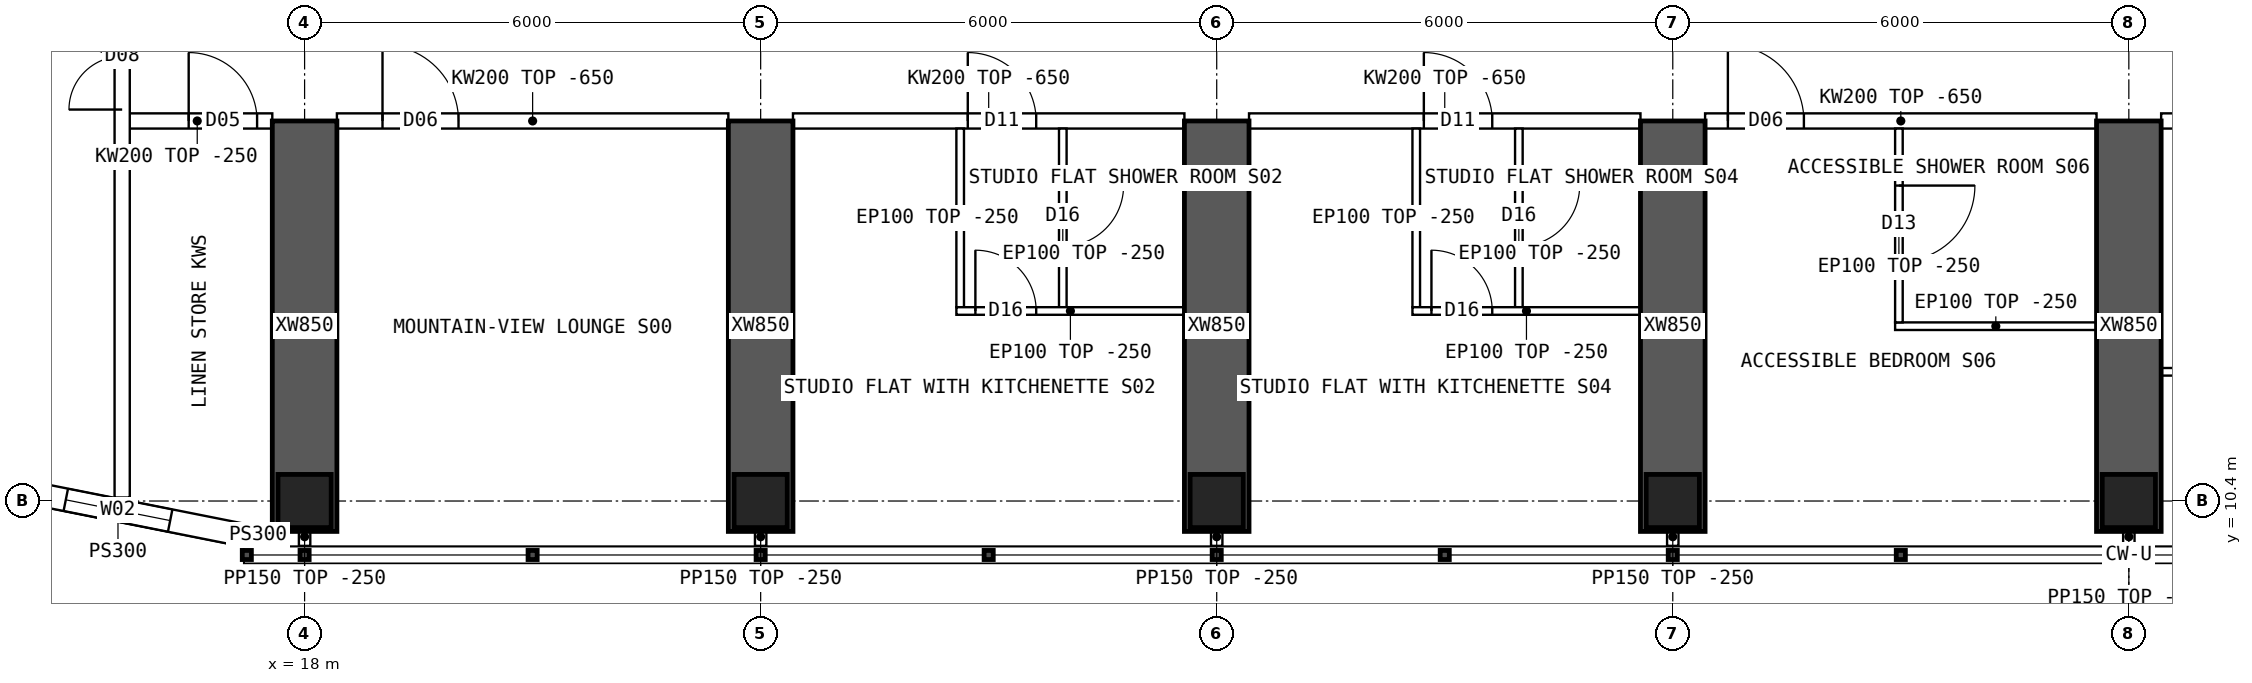
"""IFC4 building model, lengths in metres.
Left out: names, types, materials, properties, quantities, classifications, styles, units other than length and angle.
Written with IfcOpenShell. Run it as: python <this file> out.ifc"""

import sys

from ifc_helpers import new_model, si_unit, direction, frame, frame_2d, origin, origin_2d, place, context, subcontext, project, spatial, polyline, rectangle, hollow_rectangle, outline, extrude, element, fill, save


model = new_model("IFC4")
c1 = context("Model", 3, precision=1e-05, world=origin(), true_north=direction((0.0, 1.0)))
c2 = subcontext(c1, "Body", "Model", "MODEL_VIEW")
j1 = project(units=[si_unit("LENGTHUNIT", "METRE"), si_unit("PLANEANGLEUNIT", "RADIAN")], contexts=[c1])
p1 = place(None, origin())
s1 = spatial("IfcSite", under=j1, at=p1, CompositionType="ELEMENT")
p2 = place(p1, origin())
s2 = spatial("IfcBuilding", under=s1, at=p2, CompositionType="ELEMENT")
p3 = place(p2, frame((0.0, 0.0, 186.1)))
s3 = spatial("IfcBuildingStorey", under=s2, at=p3, CompositionType="ELEMENT", Elevation=186.1)
for number, where, z_axis, x_axis in (
    (1, (18.0, 10.4, 0.0), (0.0, 0.0, 1.0), (1.0, 0.0, 0.0)),
    (2, (24.0, 10.4, 0.0), (0.0, 0.0, 1.0), (1.0, 0.0, 0.0)),
    (3, (30.0, 10.4, 0.0), (0.0, 0.0, 1.0), (1.0, 0.0, 0.0)),
    (4, (36.0, 10.4, 0.0), (0.0, 0.0, 1.0), (1.0, 0.0, 0.0)),
    (5, (42.0, 10.4, 0.0), (0.0, 0.0, 1.0), (1.0, 0.0, 0.0)),
):
    element("IfcColumn", number, at=place(p3, frame(where, z_axis=z_axis, x_axis=x_axis)), inside=s3, PredefinedType="COLUMN", context=c2, shape_type="SweptSolid", body=[
        extrude(hollow_rectangle(XDim=0.7, YDim=0.7, WallThickness=0.07, at=origin_2d()), origin(), (0.0, 0.0, 1.0), 3.75),
    ])
for number, where, z_axis, x_axis in (
    (6, (18.0, 10.0, 0.0), (0.0, 0.0, 1.0), (0.0, 1.0, 0.0)),
    (7, (24.0, 10.0, 0.0), (0.0, 0.0, 1.0), (0.0, 1.0, 0.0)),
    (8, (30.0, 10.0, 0.0), (0.0, 0.0, 1.0), (0.0, 1.0, 0.0)),
    (9, (36.0, 10.0, 0.0), (0.0, 0.0, 1.0), (0.0, 1.0, 0.0)),
    (10, (42.0, 10.0, 0.0), (0.0, 0.0, 1.0), (0.0, 1.0, 0.0)),
):
    element("IfcWall", number, at=place(p3, frame(where, z_axis=z_axis, x_axis=x_axis)), inside=s3, PredefinedType="SHEAR", context=c2, shape_type="SweptSolid", body=[
        extrude(rectangle(XDim=5.4, YDim=0.85, at=frame_2d((2.7, 0.0))), origin(), (0.0, 0.0, 1.0), 3.75),
    ])
p4 = place(p3, frame((13.89, 10.608, 0.0), z_axis=(0.0, 0.0, 1.0), x_axis=(0.98078325777, -0.195100490205, 0.0)))
e11 = element("IfcWall", 11, at=p4, inside=s3, PredefinedType="SOLIDWALL", context=c2, shape_type="SweptSolid", body=[
    extrude(outline(polyline([(-0.03, -0.15), (3.405, -0.15), (3.345, 0.15), (0.03, 0.15), (-0.03, -0.15)])), origin(), (0.0, 0.0, 1.0), 3.5),
])
p5 = place(p4, frame((0.988, 0.0, 0.9)))
e12 = element("IfcOpeningElement", 12, at=p5, cuts=e11, PredefinedType="OPENING", context=c2, shape_type="SweptSolid", body=[
    extrude(rectangle(XDim=1.4, YDim=1.8, at=frame_2d((0.7, 0.9))), frame((0.0, 0.16, 0.0), z_axis=(0.0, -1.0, 0.0), x_axis=(1.0, 0.0, 0.0)), (0.0, 0.0, 1.0), 0.32),
])
p6 = place(p3, frame((17.2, 9.95, 0.0), z_axis=(0.0, 0.0, 1.0), x_axis=(1.0, 0.0, 0.0)))
e13 = element("IfcWall", 13, at=p6, inside=s3, PredefinedType="SOLIDWALL", context=c2, shape_type="SweptSolid", body=[
    extrude(rectangle(XDim=0.375, YDim=0.3, at=frame_2d((0.188, 0.0))), origin(), (0.0, 0.0, 1.0), 3.5),
])
p7 = place(p3, frame((15.6, 15.4, 0.0), z_axis=(0.0, 0.0, 1.0), x_axis=(1.0, 0.0, 0.0)))
e14 = element("IfcWall", 14, at=p7, inside=s3, PredefinedType="SOLIDWALL", context=c2, shape_type="SweptSolid", body=[
    extrude(rectangle(XDim=1.975, YDim=0.2, at=frame_2d((0.987, 0.0))), origin(), (0.0, 0.0, 1.0), 3.5),
])
p8 = place(p7, frame((0.875, 0.0, 0.0)))
e15 = element("IfcOpeningElement", 15, at=p8, cuts=e14, PredefinedType="OPENING", context=c2, shape_type="SweptSolid", body=[
    extrude(rectangle(XDim=0.9, YDim=2.1, at=frame_2d((0.45, 1.05))), frame((0.0, 0.11, 0.0), z_axis=(0.0, -1.0, 0.0), x_axis=(1.0, 0.0, 0.0)), (0.0, 0.0, 1.0), 0.22),
])
p9 = place(p3, frame((18.425, 15.4, 0.0), z_axis=(0.0, 0.0, 1.0), x_axis=(1.0, 0.0, 0.0)))
e16 = element("IfcWall", 16, at=p9, inside=s3, PredefinedType="SOLIDWALL", context=c2, shape_type="SweptSolid", body=[
    extrude(outline(polyline([(0.0, 0.0), (5.15, 0.0), (5.15, 3.1), (0.0, 3.1), (0.0, 0.0)])), frame((0.0, 0.1, 0.0), z_axis=(0.0, -1.0, 0.0), x_axis=(1.0, 0.0, 0.0)), (0.0, 0.0, 1.0), 0.2),
])
p10 = place(p9, frame((0.6, 0.0, 0.0)))
e17 = element("IfcOpeningElement", 17, at=p10, cuts=e16, PredefinedType="OPENING", context=c2, shape_type="SweptSolid", body=[
    extrude(rectangle(XDim=1.0, YDim=2.1, at=frame_2d((0.5, 1.05))), frame((0.0, 0.11, 0.0), z_axis=(0.0, -1.0, 0.0), x_axis=(1.0, 0.0, 0.0)), (0.0, 0.0, 1.0), 0.22),
])
p11 = place(p3, frame((24.425, 15.4, 0.0), z_axis=(0.0, 0.0, 1.0), x_axis=(1.0, 0.0, 0.0)))
e18 = element("IfcWall", 18, at=p11, inside=s3, PredefinedType="SOLIDWALL", context=c2, shape_type="SweptSolid", body=[
    extrude(outline(polyline([(0.0, 0.0), (5.15, 0.0), (5.15, 3.1), (0.0, 3.1), (0.0, 0.0)])), frame((0.0, 0.1, 0.0), z_axis=(0.0, -1.0, 0.0), x_axis=(1.0, 0.0, 0.0)), (0.0, 0.0, 1.0), 0.2),
])
p12 = place(p11, frame((2.3, 0.0, 0.0)))
e19 = element("IfcOpeningElement", 19, at=p12, cuts=e18, PredefinedType="OPENING", context=c2, shape_type="SweptSolid", body=[
    extrude(rectangle(XDim=0.9, YDim=2.1, at=frame_2d((0.45, 1.05))), frame((0.0, 0.11, 0.0), z_axis=(0.0, -1.0, 0.0), x_axis=(1.0, 0.0, 0.0)), (0.0, 0.0, 1.0), 0.22),
])
p13 = place(p3, frame((30.425, 15.4, 0.0), z_axis=(0.0, 0.0, 1.0), x_axis=(1.0, 0.0, 0.0)))
e20 = element("IfcWall", 20, at=p13, inside=s3, PredefinedType="SOLIDWALL", context=c2, shape_type="SweptSolid", body=[
    extrude(outline(polyline([(0.0, 0.0), (5.15, 0.0), (5.15, 3.1), (0.0, 3.1), (0.0, 0.0)])), frame((0.0, 0.1, 0.0), z_axis=(0.0, -1.0, 0.0), x_axis=(1.0, 0.0, 0.0)), (0.0, 0.0, 1.0), 0.2),
])
p14 = place(p13, frame((2.3, 0.0, 0.0)))
e21 = element("IfcOpeningElement", 21, at=p14, cuts=e20, PredefinedType="OPENING", context=c2, shape_type="SweptSolid", body=[
    extrude(rectangle(XDim=0.9, YDim=2.1, at=frame_2d((0.45, 1.05))), frame((0.0, 0.11, 0.0), z_axis=(0.0, -1.0, 0.0), x_axis=(1.0, 0.0, 0.0)), (0.0, 0.0, 1.0), 0.22),
])
p15 = place(p3, frame((36.425, 15.4, 0.0), z_axis=(0.0, 0.0, 1.0), x_axis=(1.0, 0.0, 0.0)))
e22 = element("IfcWall", 22, at=p15, inside=s3, PredefinedType="SOLIDWALL", context=c2, shape_type="SweptSolid", body=[
    extrude(outline(polyline([(0.0, 0.0), (5.15, 0.0), (5.15, 3.1), (0.0, 3.1), (0.0, 0.0)])), frame((0.0, 0.1, 0.0), z_axis=(0.0, -1.0, 0.0), x_axis=(1.0, 0.0, 0.0)), (0.0, 0.0, 1.0), 0.2),
])
p16 = place(p15, frame((0.3, 0.0, 0.0)))
e23 = element("IfcOpeningElement", 23, at=p16, cuts=e22, PredefinedType="OPENING", context=c2, shape_type="SweptSolid", body=[
    extrude(rectangle(XDim=1.0, YDim=2.1, at=frame_2d((0.5, 1.05))), frame((0.0, 0.11, 0.0), z_axis=(0.0, -1.0, 0.0), x_axis=(1.0, 0.0, 0.0)), (0.0, 0.0, 1.0), 0.22),
])
p17 = place(p3, frame((42.425, 15.4, 0.0), z_axis=(0.0, 0.0, 1.0), x_axis=(1.0, 0.0, 0.0)))
e24 = element("IfcWall", 24, at=p17, inside=s3, PredefinedType="SOLIDWALL", context=c2, shape_type="SweptSolid", body=[
    extrude(outline(polyline([(0.0, 0.0), (5.15, 0.0), (5.15, 3.1), (0.0, 3.1), (0.0, 0.0)])), frame((0.0, 0.1, 0.0), z_axis=(0.0, -1.0, 0.0), x_axis=(1.0, 0.0, 0.0)), (0.0, 0.0, 1.0), 0.2),
])
p18 = place(p17, frame((2.6, 0.0, 0.0)))
e25 = element("IfcOpeningElement", 25, at=p18, cuts=e24, PredefinedType="OPENING", context=c2, shape_type="SweptSolid", body=[
    extrude(rectangle(XDim=0.9, YDim=2.1, at=frame_2d((0.45, 1.05))), frame((0.0, 0.11, 0.0), z_axis=(0.0, -1.0, 0.0), x_axis=(1.0, 0.0, 0.0)), (0.0, 0.0, 1.0), 0.22),
])
p19 = place(p3, frame((29.575, 12.9, 0.0), z_axis=(0.0, 0.0, 1.0), x_axis=(-1.0, 0.0, 0.0)))
e26 = element("IfcWall", 26, at=p19, inside=s3, PredefinedType="PARTITIONING", context=c2, shape_type="SweptSolid", body=[
    extrude(rectangle(XDim=3.0, YDim=0.1, at=frame_2d((1.5, 0.0))), origin(), (0.0, 0.0, 1.0), 3.5),
])
p20 = place(p19, frame((1.95, 0.0, 0.0)))
e27 = element("IfcOpeningElement", 27, at=p20, cuts=e26, PredefinedType="OPENING", context=c2, shape_type="SweptSolid", body=[
    extrude(rectangle(XDim=0.8, YDim=2.1, at=frame_2d((0.4, 1.05))), frame((0.0, 0.06, 0.0), z_axis=(0.0, -1.0, 0.0), x_axis=(1.0, 0.0, 0.0)), (0.0, 0.0, 1.0), 0.12),
])
p21 = place(p3, frame((26.625, 12.95, 0.0), z_axis=(0.0, 0.0, 1.0), x_axis=(0.0, 1.0, 0.0)))
e28 = element("IfcWall", 28, at=p21, inside=s3, PredefinedType="PARTITIONING", context=c2, shape_type="SweptSolid", body=[
    extrude(outline(polyline([(0.0, 0.0), (2.35, 0.0), (2.35, 3.1), (2.302, 3.1), (2.3, 3.5), (0.0, 3.5), (0.0, 0.0)])), frame((0.0, 0.05, 0.0), z_axis=(0.0, -1.0, 0.0), x_axis=(1.0, 0.0, 0.0)), (0.0, 0.0, 1.0), 0.1),
])
p22 = place(p3, frame((27.975, 12.95, 0.0), z_axis=(0.0, 0.0, 1.0), x_axis=(0.0, 1.0, 0.0)))
e29 = element("IfcWall", 29, at=p22, inside=s3, PredefinedType="PARTITIONING", context=c2, shape_type="SweptSolid", body=[
    extrude(outline(polyline([(0.0, 0.0), (2.35, 0.0), (2.35, 3.1), (2.302, 3.1), (2.3, 3.5), (0.0, 3.5), (0.0, 0.0)])), frame((0.0, 0.05, 0.0), z_axis=(0.0, -1.0, 0.0), x_axis=(1.0, 0.0, 0.0)), (0.0, 0.0, 1.0), 0.1),
])
p23 = place(p22, frame((0.8, 0.0, 0.0)))
e30 = element("IfcOpeningElement", 30, at=p23, cuts=e29, PredefinedType="OPENING", context=c2, shape_type="SweptSolid", body=[
    extrude(rectangle(XDim=0.8, YDim=2.1, at=frame_2d((0.4, 1.05))), frame((0.0, 0.06, 0.0), z_axis=(0.0, -1.0, 0.0), x_axis=(1.0, 0.0, 0.0)), (0.0, 0.0, 1.0), 0.12),
])
p24 = place(p3, frame((35.575, 12.9, 0.0), z_axis=(0.0, 0.0, 1.0), x_axis=(-1.0, 0.0, 0.0)))
e31 = element("IfcWall", 31, at=p24, inside=s3, PredefinedType="PARTITIONING", context=c2, shape_type="SweptSolid", body=[
    extrude(rectangle(XDim=3.0, YDim=0.1, at=frame_2d((1.5, 0.0))), origin(), (0.0, 0.0, 1.0), 3.5),
])
p25 = place(p24, frame((1.95, 0.0, 0.0)))
e32 = element("IfcOpeningElement", 32, at=p25, cuts=e31, PredefinedType="OPENING", context=c2, shape_type="SweptSolid", body=[
    extrude(rectangle(XDim=0.8, YDim=2.1, at=frame_2d((0.4, 1.05))), frame((0.0, 0.06, 0.0), z_axis=(0.0, -1.0, 0.0), x_axis=(1.0, 0.0, 0.0)), (0.0, 0.0, 1.0), 0.12),
])
p26 = place(p3, frame((32.625, 12.95, 0.0), z_axis=(0.0, 0.0, 1.0), x_axis=(0.0, 1.0, 0.0)))
e33 = element("IfcWall", 33, at=p26, inside=s3, PredefinedType="PARTITIONING", context=c2, shape_type="SweptSolid", body=[
    extrude(outline(polyline([(0.0, 0.0), (2.35, 0.0), (2.35, 3.1), (2.302, 3.1), (2.3, 3.5), (0.0, 3.5), (0.0, 0.0)])), frame((0.0, 0.05, 0.0), z_axis=(0.0, -1.0, 0.0), x_axis=(1.0, 0.0, 0.0)), (0.0, 0.0, 1.0), 0.1),
])
p27 = place(p3, frame((33.975, 12.95, 0.0), z_axis=(0.0, 0.0, 1.0), x_axis=(0.0, 1.0, 0.0)))
e34 = element("IfcWall", 34, at=p27, inside=s3, PredefinedType="PARTITIONING", context=c2, shape_type="SweptSolid", body=[
    extrude(outline(polyline([(0.0, 0.0), (2.35, 0.0), (2.35, 3.1), (2.302, 3.1), (2.3, 3.5), (0.0, 3.5), (0.0, 0.0)])), frame((0.0, 0.05, 0.0), z_axis=(0.0, -1.0, 0.0), x_axis=(1.0, 0.0, 0.0)), (0.0, 0.0, 1.0), 0.1),
])
p28 = place(p27, frame((0.8, 0.0, 0.0)))
e35 = element("IfcOpeningElement", 35, at=p28, cuts=e34, PredefinedType="OPENING", context=c2, shape_type="SweptSolid", body=[
    extrude(rectangle(XDim=0.8, YDim=2.1, at=frame_2d((0.4, 1.05))), frame((0.0, 0.06, 0.0), z_axis=(0.0, -1.0, 0.0), x_axis=(1.0, 0.0, 0.0)), (0.0, 0.0, 1.0), 0.12),
])
p29 = place(p3, frame((38.925, 12.7, 0.0), z_axis=(0.0, 0.0, 1.0), x_axis=(1.0, 0.0, 0.0)))
e36 = element("IfcWall", 36, at=p29, inside=s3, PredefinedType="PARTITIONING", context=c2, shape_type="SweptSolid", body=[
    extrude(rectangle(XDim=2.65, YDim=0.1, at=frame_2d((1.325, 0.0))), origin(), (0.0, 0.0, 1.0), 3.5),
])
p30 = place(p3, frame((38.975, 12.75, 0.0), z_axis=(0.0, 0.0, 1.0), x_axis=(0.0, 1.0, 0.0)))
e37 = element("IfcWall", 37, at=p30, inside=s3, PredefinedType="PARTITIONING", context=c2, shape_type="SweptSolid", body=[
    extrude(outline(polyline([(0.0, 0.0), (2.55, 0.0), (2.55, 3.1), (2.502, 3.1), (2.5, 3.5), (0.0, 3.5), (0.0, 0.0)])), frame((0.0, 0.05, 0.0), z_axis=(0.0, -1.0, 0.0), x_axis=(1.0, 0.0, 0.0)), (0.0, 0.0, 1.0), 0.1),
])
p31 = place(p30, frame((0.8, 0.0, 0.0)))
e38 = element("IfcOpeningElement", 38, at=p31, cuts=e37, PredefinedType="OPENING", context=c2, shape_type="SweptSolid", body=[
    extrude(rectangle(XDim=1.0, YDim=2.1, at=frame_2d((0.5, 1.05))), frame((0.0, 0.06, 0.0), z_axis=(0.0, -1.0, 0.0), x_axis=(1.0, 0.0, 0.0)), (0.0, 0.0, 1.0), 0.12),
])
p32 = place(p3, frame((44.975, 12.1, 0.0), z_axis=(0.0, 0.0, 1.0), x_axis=(-1.0, 0.0, 0.0)))
e39 = element("IfcWall", 39, at=p32, inside=s3, PredefinedType="PARTITIONING", context=c2, shape_type="SweptSolid", body=[
    extrude(rectangle(XDim=2.55, YDim=0.1, at=frame_2d((1.275, 0.0))), origin(), (0.0, 0.0, 1.0), 3.5),
])
p33 = place(p32, frame((0.825, 0.0, 0.0)))
e40 = element("IfcOpeningElement", 40, at=p33, cuts=e39, PredefinedType="OPENING", context=c2, shape_type="SweptSolid", body=[
    extrude(rectangle(XDim=0.9, YDim=2.1, at=frame_2d((0.45, 1.05))), frame((0.0, 0.06, 0.0), z_axis=(0.0, -1.0, 0.0), x_axis=(1.0, 0.0, 0.0)), (0.0, 0.0, 1.0), 0.12),
])
p34 = place(p3, frame((15.6, 10.446, 0.0), z_axis=(0.0, 0.0, 1.0), x_axis=(0.0, 1.0, 0.0)))
e41 = element("IfcWall", 41, at=p34, inside=s3, PredefinedType="SOLIDWALL", context=c2, shape_type="SweptSolid", body=[
    extrude(rectangle(XDim=43.107, YDim=0.2, at=frame_2d((21.554, 0.0))), origin(), (0.0, 0.0, 1.0), 3.5),
])
p35 = place(p34, frame((22.634, 0.0, 0.0)))
e42 = element("IfcOpeningElement", 42, at=p35, cuts=e41, PredefinedType="OPENING", context=c2, shape_type="SweptSolid", body=[
    extrude(rectangle(XDim=1.2, YDim=2.1, at=frame_2d((0.6, 1.05))), frame((0.0, 0.11, 0.0), z_axis=(0.0, -1.0, 0.0), x_axis=(1.0, 0.0, 0.0)), (0.0, 0.0, 1.0), 0.22),
])
p36 = place(p34, frame((5.104, 0.0, 0.0)))
e43 = element("IfcOpeningElement", 43, at=p36, cuts=e41, PredefinedType="OPENING", context=c2, shape_type="SweptSolid", body=[
    extrude(rectangle(XDim=1.4, YDim=2.1, at=frame_2d((0.7, 1.05))), frame((0.0, 0.11, 0.0), z_axis=(0.0, -1.0, 0.0), x_axis=(1.0, 0.0, 0.0)), (0.0, 0.0, 1.0), 0.22),
])
p37 = place(p34, frame((36.504, 0.0, 0.0)))
e44 = element("IfcOpeningElement", 44, at=p37, cuts=e41, PredefinedType="OPENING", context=c2, shape_type="SweptSolid", body=[
    extrude(rectangle(XDim=1.4, YDim=2.1, at=frame_2d((0.7, 1.05))), frame((0.0, 0.11, 0.0), z_axis=(0.0, -1.0, 0.0), x_axis=(1.0, 0.0, 0.0)), (0.0, 0.0, 1.0), 0.22),
])
for number, where, z_axis, x_axis in (
    (45, (18.0, 10.05, 0.0), (0.0, 0.0, 1.0), (0.0, -1.0, 0.0)),
    (46, (24.0, 10.05, 0.0), (0.0, 0.0, 1.0), (0.0, -1.0, 0.0)),
    (47, (30.0, 10.05, 0.0), (0.0, 0.0, 1.0), (0.0, -1.0, 0.0)),
    (48, (36.0, 10.05, 0.0), (0.0, 0.0, 1.0), (0.0, -1.0, 0.0)),
    (49, (42.0, 10.05, 0.0), (0.0, 0.0, 1.0), (0.0, -1.0, 0.0)),
):
    element("IfcWall", number, at=place(p3, frame(where, z_axis=z_axis, x_axis=x_axis)), inside=s3, PredefinedType="PARTITIONING", context=c2, shape_type="SweptSolid", body=[
        extrude(rectangle(XDim=0.24, YDim=0.15, at=frame_2d((0.12, 0.0))), origin(), (0.0, 0.0, 1.0), 3.5),
    ])
p38 = place(p5, origin())
e50 = element("IfcWindow", 50, at=p38, inside=s3, PartitioningType="SINGLE_PANEL", PredefinedType="WINDOW", context=c2, shape_type="SweptSolid", body=[
    extrude(rectangle(XDim=1.4, YDim=1.8, at=frame_2d((0.7, 0.9))), frame((0.0, 0.03, 0.0), z_axis=(0.0, -1.0, 0.0), x_axis=(1.0, 0.0, 0.0)), (0.0, 0.0, 1.0), 0.06),
])
fill(e12, e50)
p39 = place(p10, origin())
e51 = element("IfcDoor", 51, at=p39, inside=s3, OperationType="SINGLE_SWING_LEFT", PredefinedType="DOOR", context=c2, shape_type="SweptSolid", body=[
    extrude(rectangle(XDim=1.0, YDim=2.1, at=frame_2d((0.5, 1.05))), frame((0.0, 0.025, 0.0), z_axis=(0.0, -1.0, 0.0), x_axis=(1.0, 0.0, 0.0)), (0.0, 0.0, 1.0), 0.05),
])
fill(e17, e51)
p40 = place(p20, origin())
e52 = element("IfcDoor", 52, at=p40, inside=s3, OperationType="SINGLE_SWING_RIGHT", PredefinedType="DOOR", context=c2, shape_type="SweptSolid", body=[
    extrude(rectangle(XDim=0.8, YDim=2.1, at=frame_2d((0.4, 1.05))), frame((0.0, 0.025, 0.0), z_axis=(0.0, -1.0, 0.0), x_axis=(1.0, 0.0, 0.0)), (0.0, 0.0, 1.0), 0.05),
])
fill(e27, e52)
p41 = place(p23, origin())
e53 = element("IfcDoor", 53, at=p41, inside=s3, OperationType="SINGLE_SWING_RIGHT", PredefinedType="DOOR", context=c2, shape_type="SweptSolid", body=[
    extrude(rectangle(XDim=0.8, YDim=2.1, at=frame_2d((0.4, 1.05))), frame((0.0, 0.025, 0.0), z_axis=(0.0, -1.0, 0.0), x_axis=(1.0, 0.0, 0.0)), (0.0, 0.0, 1.0), 0.05),
])
fill(e30, e53)
p42 = place(p12, origin())
e54 = element("IfcDoor", 54, at=p42, inside=s3, OperationType="SINGLE_SWING_LEFT", PredefinedType="DOOR", context=c2, shape_type="SweptSolid", body=[
    extrude(rectangle(XDim=0.9, YDim=2.1, at=frame_2d((0.45, 1.05))), frame((0.0, 0.025, 0.0), z_axis=(0.0, -1.0, 0.0), x_axis=(1.0, 0.0, 0.0)), (0.0, 0.0, 1.0), 0.05),
])
fill(e19, e54)
p43 = place(p25, origin())
e55 = element("IfcDoor", 55, at=p43, inside=s3, OperationType="SINGLE_SWING_RIGHT", PredefinedType="DOOR", context=c2, shape_type="SweptSolid", body=[
    extrude(rectangle(XDim=0.8, YDim=2.1, at=frame_2d((0.4, 1.05))), frame((0.0, 0.025, 0.0), z_axis=(0.0, -1.0, 0.0), x_axis=(1.0, 0.0, 0.0)), (0.0, 0.0, 1.0), 0.05),
])
fill(e32, e55)
p44 = place(p28, origin())
e56 = element("IfcDoor", 56, at=p44, inside=s3, OperationType="SINGLE_SWING_RIGHT", PredefinedType="DOOR", context=c2, shape_type="SweptSolid", body=[
    extrude(rectangle(XDim=0.8, YDim=2.1, at=frame_2d((0.4, 1.05))), frame((0.0, 0.025, 0.0), z_axis=(0.0, -1.0, 0.0), x_axis=(1.0, 0.0, 0.0)), (0.0, 0.0, 1.0), 0.05),
])
fill(e35, e56)
p45 = place(p14, origin())
e57 = element("IfcDoor", 57, at=p45, inside=s3, OperationType="SINGLE_SWING_LEFT", PredefinedType="DOOR", context=c2, shape_type="SweptSolid", body=[
    extrude(rectangle(XDim=0.9, YDim=2.1, at=frame_2d((0.45, 1.05))), frame((0.0, 0.025, 0.0), z_axis=(0.0, -1.0, 0.0), x_axis=(1.0, 0.0, 0.0)), (0.0, 0.0, 1.0), 0.05),
])
fill(e21, e57)
p46 = place(p31, origin())
e58 = element("IfcDoor", 58, at=p46, inside=s3, OperationType="SINGLE_SWING_RIGHT", PredefinedType="DOOR", context=c2, shape_type="SweptSolid", body=[
    extrude(rectangle(XDim=1.0, YDim=2.1, at=frame_2d((0.5, 1.05))), frame((0.0, 0.025, 0.0), z_axis=(0.0, -1.0, 0.0), x_axis=(1.0, 0.0, 0.0)), (0.0, 0.0, 1.0), 0.05),
])
fill(e38, e58)
p47 = place(p16, origin())
e59 = element("IfcDoor", 59, at=p47, inside=s3, OperationType="SINGLE_SWING_LEFT", PredefinedType="DOOR", context=c2, shape_type="SweptSolid", body=[
    extrude(rectangle(XDim=1.0, YDim=2.1, at=frame_2d((0.5, 1.05))), frame((0.0, 0.025, 0.0), z_axis=(0.0, -1.0, 0.0), x_axis=(1.0, 0.0, 0.0)), (0.0, 0.0, 1.0), 0.05),
])
fill(e23, e59)
p48 = place(p36, origin())
e60 = element("IfcDoor", 60, at=p48, inside=s3, OperationType="DOUBLE_DOOR_SINGLE_SWING", PredefinedType="DOOR", context=c2, shape_type="SweptSolid", body=[
    extrude(rectangle(XDim=1.4, YDim=2.1, at=frame_2d((0.7, 1.05))), frame((0.0, 0.025, 0.0), z_axis=(0.0, -1.0, 0.0), x_axis=(1.0, 0.0, 0.0)), (0.0, 0.0, 1.0), 0.05),
])
fill(e43, e60)
p49 = place(p8, origin())
e61 = element("IfcDoor", 61, at=p49, inside=s3, OperationType="SINGLE_SWING_LEFT", PredefinedType="DOOR", context=c2, shape_type="SweptSolid", body=[
    extrude(rectangle(XDim=0.9, YDim=2.1, at=frame_2d((0.45, 1.05))), frame((0.0, 0.025, 0.0), z_axis=(0.0, -1.0, 0.0), x_axis=(1.0, 0.0, 0.0)), (0.0, 0.0, 1.0), 0.05),
])
fill(e15, e61)
save(model, sys.argv[1])
